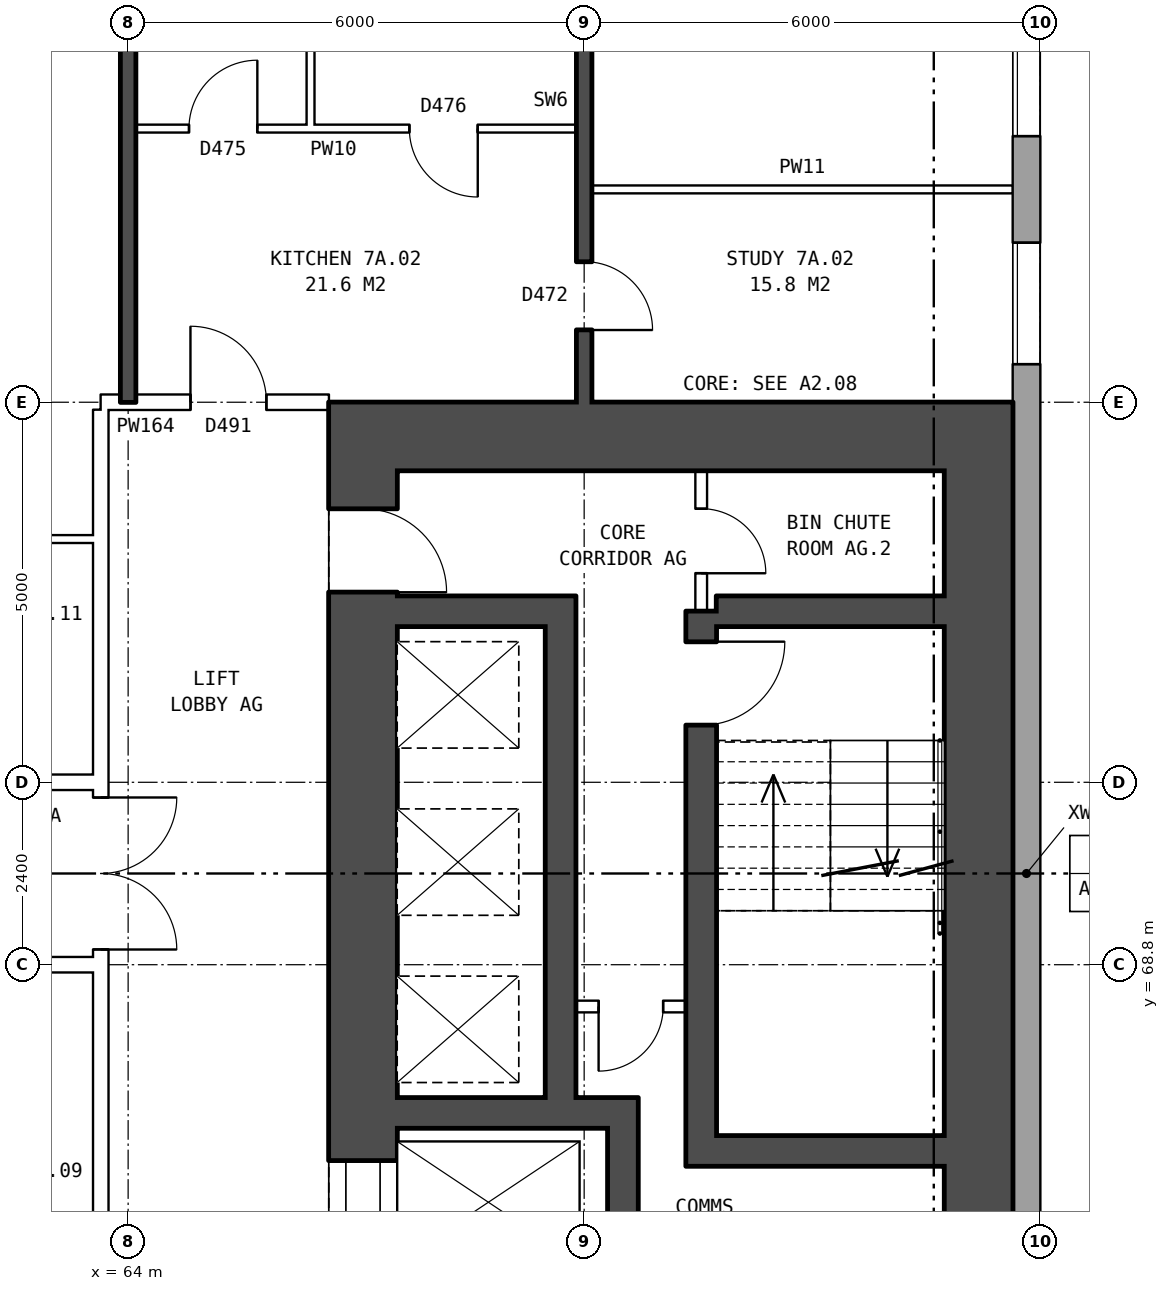
"""IFC4 building model, lengths in metres.
Left out: names, types, materials, properties, quantities, classifications, styles, units other than length and angle.
Written with IfcOpenShell. Run it as: python <this file> out.ifc"""

import sys

from ifc_helpers import new_model, si_unit, direction, frame, frame_2d, origin, place, context, subcontext, project, spatial, rectangle, extrude, element, fill, save


model = new_model("IFC4")
c1 = context("Model", 3, precision=1e-05, world=origin(), true_north=direction((0.0, 1.0)))
c2 = subcontext(c1, "Body", "Model", "MODEL_VIEW")
j1 = project(units=[si_unit("LENGTHUNIT", "METRE"), si_unit("PLANEANGLEUNIT", "RADIAN")], contexts=[c1])
p1 = place(None, origin())
s1 = spatial("IfcSite", under=j1, at=p1, CompositionType="ELEMENT")
p2 = place(p1, origin())
s2 = spatial("IfcBuilding", under=s1, at=p2, CompositionType="ELEMENT")
p3 = place(p2, frame((0.0, 0.0, 28.8)))
s3 = spatial("IfcBuildingStorey", under=s2, at=p3, CompositionType="ELEMENT", Elevation=28.8)
p4 = place(p3, frame((75.82, 57.075, 0.0), z_axis=(0.0, 0.0, 1.0), x_axis=(0.0, 1.0, 0.0)))
e1 = element("IfcWall", 1, at=p4, inside=s3, PredefinedType="STANDARD", context=c2, shape_type="SweptSolid", body=[
    extrude(rectangle(XDim=25.851, YDim=0.36, at=frame_2d((12.925, 0.0))), origin(), (0.0, 0.0, 1.0), 2.85),
])
p5 = place(p4, frame((1.625, 0.0, 0.8)))
e2 = element("IfcOpeningElement", 2, at=p5, cuts=e1, PredefinedType="OPENING", context=c2, shape_type="SweptSolid", body=[
    extrude(rectangle(XDim=1.6, YDim=1.8, at=frame_2d((0.8, 0.9))), frame((0.0, 0.19, 0.0), z_axis=(0.0, -1.0, 0.0), x_axis=(1.0, 0.0, 0.0)), (0.0, 0.0, 1.0), 0.38),
])
p6 = place(p4, frame((4.625, 0.0, 0.8)))
e3 = element("IfcOpeningElement", 3, at=p6, cuts=e1, PredefinedType="OPENING", context=c2, shape_type="SweptSolid", body=[
    extrude(rectangle(XDim=1.6, YDim=1.8, at=frame_2d((0.8, 0.9))), frame((0.0, 0.19, 0.0), z_axis=(0.0, -1.0, 0.0), x_axis=(1.0, 0.0, 0.0)), (0.0, 0.0, 1.0), 0.38),
])
p7 = place(p4, frame((19.625, 0.0, 0.8)))
e4 = element("IfcOpeningElement", 4, at=p7, cuts=e1, PredefinedType="OPENING", context=c2, shape_type="SweptSolid", body=[
    extrude(rectangle(XDim=1.6, YDim=1.8, at=frame_2d((0.8, 0.9))), frame((0.0, 0.19, 0.0), z_axis=(0.0, -1.0, 0.0), x_axis=(1.0, 0.0, 0.0)), (0.0, 0.0, 1.0), 0.38),
])
p8 = place(p4, frame((22.625, 0.0, 0.8)))
e5 = element("IfcOpeningElement", 5, at=p8, cuts=e1, PredefinedType="OPENING", context=c2, shape_type="SweptSolid", body=[
    extrude(rectangle(XDim=1.6, YDim=1.8, at=frame_2d((0.8, 0.9))), frame((0.0, 0.19, 0.0), z_axis=(0.0, -1.0, 0.0), x_axis=(1.0, 0.0, 0.0)), (0.0, 0.0, 1.0), 0.38),
])
p9 = place(p3, frame((67.09, 64.7, 0.0), z_axis=(0.0, 0.0, 1.0), x_axis=(0.0, 1.0, 0.0)))
e6 = element("IfcWall", 6, at=p9, inside=s3, PredefinedType="SHEAR", context=c2, shape_type="SweptSolid", body=[
    extrude(rectangle(XDim=10.6, YDim=0.9, at=frame_2d((5.3, 0.0))), origin(), (0.0, 0.0, 1.0), 2.85),
])
p10 = place(p9, frame((0.425, 0.0, 0.0)))
e7 = element("IfcOpeningElement", 7, at=p10, cuts=e6, PredefinedType="OPENING", context=c2, shape_type="SweptSolid", body=[
    extrude(rectangle(XDim=1.1, YDim=2.1, at=frame_2d((0.55, 1.05))), frame((0.0, 0.46, 0.0), z_axis=(0.0, -1.0, 0.0), x_axis=(1.0, 0.0, 0.0)), (0.0, 0.0, 1.0), 0.92),
])
p11 = place(p9, frame((9.0, 0.0, 0.0)))
e8 = element("IfcOpeningElement", 8, at=p11, cuts=e6, PredefinedType="OPENING", context=c2, shape_type="SweptSolid", body=[
    extrude(rectangle(XDim=1.1, YDim=2.1, at=frame_2d((0.55, 1.05))), frame((0.0, 0.46, 0.0), z_axis=(0.0, -1.0, 0.0), x_axis=(1.0, 0.0, 0.0)), (0.0, 0.0, 1.0), 0.92),
])
p12 = place(p3, frame((75.19, 64.7, 0.0), z_axis=(0.0, 0.0, 1.0), x_axis=(0.0, 1.0, 0.0)))
e9 = element("IfcWall", 9, at=p12, inside=s3, PredefinedType="SHEAR", context=c2, shape_type="SweptSolid", body=[
    extrude(rectangle(XDim=10.6, YDim=0.9, at=frame_2d((5.3, 0.0))), origin(), (0.0, 0.0, 1.0), 2.85),
])
p13 = place(p3, frame((66.64, 75.75, 0.0), z_axis=(0.0, 0.0, 1.0), x_axis=(1.0, 0.0, 0.0)))
e10 = element("IfcWall", 10, at=p13, inside=s3, PredefinedType="SHEAR", context=c2, shape_type="SweptSolid", body=[
    extrude(rectangle(XDim=9.0, YDim=0.9, at=frame_2d((4.5, 0.0))), origin(), (0.0, 0.0, 1.0), 2.85),
])
p14 = place(p3, frame((71.74, 66.35, 0.0), z_axis=(0.0, 0.0, 1.0), x_axis=(1.0, 0.0, 0.0)))
e11 = element("IfcWall", 11, at=p14, inside=s3, PredefinedType="SHEAR", context=c2, shape_type="SweptSolid", body=[
    extrude(rectangle(XDim=3.0, YDim=0.4, at=frame_2d((1.5, 0.0))), origin(), (0.0, 0.0, 1.0), 2.85),
])
p15 = place(p3, frame((67.54, 66.85, 0.0), z_axis=(0.0, 0.0, 1.0), x_axis=(1.0, 0.0, 0.0)))
e12 = element("IfcWall", 12, at=p15, inside=s3, PredefinedType="SHEAR", context=c2, shape_type="SweptSolid", body=[
    extrude(rectangle(XDim=3.17, YDim=0.4, at=frame_2d((1.585, 0.0))), origin(), (0.0, 0.0, 1.0), 2.85),
])
p16 = place(p3, frame((69.89, 68.25, 0.0), z_axis=(0.0, 0.0, 1.0), x_axis=(1.0, 0.0, 0.0)))
e13 = element("IfcWall", 13, at=p16, inside=s3, PredefinedType="PARTITIONING", context=c2, shape_type="SweptSolid", body=[
    extrude(rectangle(XDim=1.45, YDim=0.15, at=frame_2d((0.725, 0.0))), origin(), (0.0, 0.0, 1.0), 2.85),
])
p17 = place(p16, frame((0.3, 0.0, 0.0)))
e14 = element("IfcOpeningElement", 14, at=p17, cuts=e13, PredefinedType="OPENING", context=c2, shape_type="SweptSolid", body=[
    extrude(rectangle(XDim=0.85, YDim=2.1, at=frame_2d((0.425, 1.05))), frame((0.0, 0.085, 0.0), z_axis=(0.0, -1.0, 0.0), x_axis=(1.0, 0.0, 0.0)), (0.0, 0.0, 1.0), 0.17),
])
p18 = place(p3, frame((67.54, 73.45, 0.0), z_axis=(0.0, 0.0, 1.0), x_axis=(1.0, 0.0, 0.0)))
e15 = element("IfcWall", 15, at=p18, inside=s3, PredefinedType="SHEAR", context=c2, shape_type="SweptSolid", body=[
    extrude(rectangle(XDim=1.95, YDim=0.4, at=frame_2d((0.975, 0.0))), origin(), (0.0, 0.0, 1.0), 2.85),
])
p19 = place(p3, frame((71.74, 73.45, 0.0), z_axis=(0.0, 0.0, 1.0), x_axis=(1.0, 0.0, 0.0)))
e16 = element("IfcWall", 16, at=p19, inside=s3, PredefinedType="SHEAR", context=c2, shape_type="SweptSolid", body=[
    extrude(rectangle(XDim=3.0, YDim=0.4, at=frame_2d((1.5, 0.0))), origin(), (0.0, 0.0, 1.0), 2.85),
])
p20 = place(p3, frame((69.69, 67.05, 0.0), z_axis=(0.0, 0.0, 1.0), x_axis=(0.0, 1.0, 0.0)))
e17 = element("IfcWall", 17, at=p20, inside=s3, PredefinedType="SHEAR", context=c2, shape_type="SweptSolid", body=[
    extrude(rectangle(XDim=6.6, YDim=0.4, at=frame_2d((3.3, 0.0))), origin(), (0.0, 0.0, 1.0), 2.85),
])
p21 = place(p3, frame((70.51, 64.7, 0.0), z_axis=(0.0, 0.0, 1.0), x_axis=(0.0, 1.0, 0.0)))
e18 = element("IfcWall", 18, at=p21, inside=s3, PredefinedType="SHEAR", context=c2, shape_type="SweptSolid", body=[
    extrude(rectangle(XDim=1.95, YDim=0.4, at=frame_2d((0.975, 0.0))), origin(), (0.0, 0.0, 1.0), 2.85),
])
p22 = place(p3, frame((71.54, 66.15, 0.0), z_axis=(0.0, 0.0, 1.0), x_axis=(0.0, 1.0, 0.0)))
e19 = element("IfcWall", 19, at=p22, inside=s3, PredefinedType="SHEAR", context=c2, shape_type="SweptSolid", body=[
    extrude(rectangle(XDim=7.3, YDim=0.4, at=frame_2d((3.65, 0.0))), origin(), (0.0, 0.0, 1.0), 2.85),
])
p23 = place(p22, frame((5.8, 0.0, 0.0)))
e20 = element("IfcOpeningElement", 20, at=p23, cuts=e19, PredefinedType="OPENING", context=c2, shape_type="SweptSolid", body=[
    extrude(rectangle(XDim=1.1, YDim=2.1, at=frame_2d((0.55, 1.05))), frame((0.0, 0.21, 0.0), z_axis=(0.0, -1.0, 0.0), x_axis=(1.0, 0.0, 0.0)), (0.0, 0.0, 1.0), 0.42),
])
p24 = place(p3, frame((71.54, 73.45, 0.0), z_axis=(0.0, 0.0, 1.0), x_axis=(0.0, 1.0, 0.0)))
e21 = element("IfcWall", 21, at=p24, inside=s3, PredefinedType="PARTITIONING", context=c2, shape_type="SweptSolid", body=[
    extrude(rectangle(XDim=1.85, YDim=0.15, at=frame_2d((0.925, 0.0))), origin(), (0.0, 0.0, 1.0), 2.85),
])
p25 = place(p24, frame((0.5, 0.0, 0.0)))
e22 = element("IfcOpeningElement", 22, at=p25, cuts=e21, PredefinedType="OPENING", context=c2, shape_type="SweptSolid", body=[
    extrude(rectangle(XDim=0.85, YDim=2.1, at=frame_2d((0.425, 1.05))), frame((0.0, 0.085, 0.0), z_axis=(0.0, -1.0, 0.0), x_axis=(1.0, 0.0, 0.0)), (0.0, 0.0, 1.0), 0.17),
])
p26 = place(p3, frame((63.64, 63.9, 0.0), z_axis=(0.0, 0.0, 1.0), x_axis=(0.0, 1.0, 0.0)))
e23 = element("IfcWall", 23, at=p26, inside=s3, PredefinedType="PARTITIONING", context=c2, shape_type="SweptSolid", body=[
    extrude(rectangle(XDim=12.2, YDim=0.2, at=frame_2d((6.1, 0.0))), origin(), (0.0, 0.0, 1.0), 2.85),
])
p27 = place(p26, frame((5.1, 0.0, 0.0)))
e24 = element("IfcOpeningElement", 24, at=p27, cuts=e23, PredefinedType="OPENING", context=c2, shape_type="SweptSolid", body=[
    extrude(rectangle(XDim=2.0, YDim=2.1, at=frame_2d((1.0, 1.05))), frame((0.0, 0.11, 0.0), z_axis=(0.0, -1.0, 0.0), x_axis=(1.0, 0.0, 0.0)), (0.0, 0.0, 1.0), 0.22),
])
p28 = place(p3, frame((44.36, 68.8, 0.0), z_axis=(0.0, 0.0, 1.0), x_axis=(1.0, 0.0, 0.0)))
e25 = element("IfcWall", 25, at=p28, inside=s3, PredefinedType="PARTITIONING", context=c2, shape_type="SweptSolid", body=[
    extrude(rectangle(XDim=19.28, YDim=0.2, at=frame_2d((9.64, 0.0))), origin(), (0.0, 0.0, 1.0), 2.85),
])
p29 = place(p28, frame((14.64, 0.0, 0.0)))
e26 = element("IfcOpeningElement", 26, at=p29, cuts=e25, PredefinedType="OPENING", context=c2, shape_type="SweptSolid", body=[
    extrude(rectangle(XDim=1.0, YDim=2.1, at=frame_2d((0.5, 1.05))), frame((0.0, 0.11, 0.0), z_axis=(0.0, -1.0, 0.0), x_axis=(1.0, 0.0, 0.0)), (0.0, 0.0, 1.0), 0.22),
])
p30 = place(p28, frame((5.64, 0.0, 0.0)))
e27 = element("IfcOpeningElement", 27, at=p30, cuts=e25, PredefinedType="OPENING", context=c2, shape_type="SweptSolid", body=[
    extrude(rectangle(XDim=1.0, YDim=2.1, at=frame_2d((0.5, 1.05))), frame((0.0, 0.11, 0.0), z_axis=(0.0, -1.0, 0.0), x_axis=(1.0, 0.0, 0.0)), (0.0, 0.0, 1.0), 0.22),
])
p31 = place(p3, frame((44.36, 71.2, 0.0), z_axis=(0.0, 0.0, 1.0), x_axis=(1.0, 0.0, 0.0)))
e28 = element("IfcWall", 28, at=p31, inside=s3, PredefinedType="PARTITIONING", context=c2, shape_type="SweptSolid", body=[
    extrude(rectangle(XDim=19.28, YDim=0.2, at=frame_2d((9.64, 0.0))), origin(), (0.0, 0.0, 1.0), 2.85),
])
p32 = place(p31, frame((14.64, 0.0, 0.0)))
e29 = element("IfcOpeningElement", 29, at=p32, cuts=e28, PredefinedType="OPENING", context=c2, shape_type="SweptSolid", body=[
    extrude(rectangle(XDim=1.0, YDim=2.1, at=frame_2d((0.5, 1.05))), frame((0.0, 0.11, 0.0), z_axis=(0.0, -1.0, 0.0), x_axis=(1.0, 0.0, 0.0)), (0.0, 0.0, 1.0), 0.22),
])
p33 = place(p31, frame((5.64, 0.0, 0.0)))
e30 = element("IfcOpeningElement", 30, at=p33, cuts=e28, PredefinedType="OPENING", context=c2, shape_type="SweptSolid", body=[
    extrude(rectangle(XDim=1.0, YDim=2.1, at=frame_2d((0.5, 1.05))), frame((0.0, 0.11, 0.0), z_axis=(0.0, -1.0, 0.0), x_axis=(1.0, 0.0, 0.0)), (0.0, 0.0, 1.0), 0.22),
])
p34 = place(p3, frame((61.0, 74.4, 0.0), z_axis=(0.0, 0.0, 1.0), x_axis=(1.0, 0.0, 0.0)))
e31 = element("IfcWall", 31, at=p34, inside=s3, PredefinedType="PARTITIONING", context=c2, shape_type="SweptSolid", body=[
    extrude(rectangle(XDim=2.64, YDim=0.1, at=frame_2d((1.32, 0.0))), origin(), (0.0, 0.0, 1.0), 2.85),
])
p35 = place(p3, frame((63.64, 76.2, 0.0), z_axis=(0.0, 0.0, 1.0), x_axis=(1.0, 0.0, 0.0)))
e32 = element("IfcWall", 32, at=p35, inside=s3, PredefinedType="PARTITIONING", context=c2, shape_type="SweptSolid", body=[
    extrude(rectangle(XDim=3.0, YDim=0.2, at=frame_2d((1.5, 0.0))), origin(), (0.0, 0.0, 1.0), 2.85),
])
p36 = place(p35, frame((1.18, 0.0, 0.0)))
e33 = element("IfcOpeningElement", 33, at=p36, cuts=e32, PredefinedType="OPENING", context=c2, shape_type="SweptSolid", body=[
    extrude(rectangle(XDim=1.0, YDim=2.1, at=frame_2d((0.5, 1.05))), frame((0.0, 0.11, 0.0), z_axis=(0.0, -1.0, 0.0), x_axis=(1.0, 0.0, 0.0)), (0.0, 0.0, 1.0), 0.22),
])
p37 = place(p3, frame((70.1, 79.0, 0.0), z_axis=(0.0, 0.0, 1.0), x_axis=(1.0, 0.0, 0.0)))
e34 = element("IfcWall", 34, at=p37, inside=s3, PredefinedType="PARTITIONING", context=c2, shape_type="SweptSolid", body=[
    extrude(rectangle(XDim=5.54, YDim=0.1, at=frame_2d((2.77, 0.0))), origin(), (0.0, 0.0, 1.0), 2.85),
])
p38 = place(p3, frame((64.1, 79.8, 0.0), z_axis=(0.0, 0.0, 1.0), x_axis=(1.0, 0.0, 0.0)))
e35 = element("IfcWall", 35, at=p38, inside=s3, PredefinedType="PARTITIONING", context=c2, shape_type="SweptSolid", body=[
    extrude(rectangle(XDim=5.8, YDim=0.1, at=frame_2d((2.9, 0.0))), origin(), (0.0, 0.0, 1.0), 2.85),
])
p39 = place(p38, frame((3.6, 0.0, 0.0)))
e36 = element("IfcOpeningElement", 36, at=p39, cuts=e35, PredefinedType="OPENING", context=c2, shape_type="SweptSolid", body=[
    extrude(rectangle(XDim=0.9, YDim=2.1, at=frame_2d((0.45, 1.05))), frame((0.0, 0.06, 0.0), z_axis=(0.0, -1.0, 0.0), x_axis=(1.0, 0.0, 0.0)), (0.0, 0.0, 1.0), 0.12),
])
p40 = place(p38, frame((0.7, 0.0, 0.0)))
e37 = element("IfcOpeningElement", 37, at=p40, cuts=e35, PredefinedType="OPENING", context=c2, shape_type="SweptSolid", body=[
    extrude(rectangle(XDim=0.9, YDim=2.1, at=frame_2d((0.45, 1.05))), frame((0.0, 0.06, 0.0), z_axis=(0.0, -1.0, 0.0), x_axis=(1.0, 0.0, 0.0)), (0.0, 0.0, 1.0), 0.12),
])
p41 = place(p3, frame((64.0, 76.2, 0.0), z_axis=(0.0, 0.0, 1.0), x_axis=(0.0, 1.0, 0.0)))
e38 = element("IfcWall", 38, at=p41, inside=s3, PredefinedType="SOLIDWALL", context=c2, shape_type="SweptSolid", body=[
    extrude(rectangle(XDim=9.44, YDim=0.2, at=frame_2d((4.72, 0.0))), origin(), (0.0, 0.0, 1.0), 2.85),
])
p42 = place(p3, frame((66.4, 79.85, 0.0), z_axis=(0.0, 0.0, 1.0), x_axis=(0.0, 1.0, 0.0)))
e39 = element("IfcWall", 39, at=p42, inside=s3, PredefinedType="PARTITIONING", context=c2, shape_type="SweptSolid", body=[
    extrude(rectangle(XDim=2.3, YDim=0.1, at=frame_2d((1.15, 0.0))), origin(), (0.0, 0.0, 1.0), 2.85),
])
p43 = place(p3, frame((70.0, 76.2, 0.0), z_axis=(0.0, 0.0, 1.0), x_axis=(0.0, 1.0, 0.0)))
e40 = element("IfcWall", 40, at=p43, inside=s3, PredefinedType="SOLIDWALL", context=c2, shape_type="SweptSolid", body=[
    extrude(rectangle(XDim=9.44, YDim=0.2, at=frame_2d((4.72, 0.0))), origin(), (0.0, 0.0, 1.0), 2.85),
])
p44 = place(p43, frame((6.07, 0.0, 0.0)))
e41 = element("IfcOpeningElement", 41, at=p44, cuts=e40, PredefinedType="OPENING", context=c2, shape_type="SweptSolid", body=[
    extrude(rectangle(XDim=0.9, YDim=2.1, at=frame_2d((0.45, 1.05))), frame((0.0, 0.11, 0.0), z_axis=(0.0, -1.0, 0.0), x_axis=(1.0, 0.0, 0.0)), (0.0, 0.0, 1.0), 0.22),
])
p45 = place(p43, frame((0.95, 0.0, 0.0)))
e42 = element("IfcOpeningElement", 42, at=p45, cuts=e40, PredefinedType="OPENING", context=c2, shape_type="SweptSolid", body=[
    extrude(rectangle(XDim=0.9, YDim=2.1, at=frame_2d((0.45, 1.05))), frame((0.0, 0.11, 0.0), z_axis=(0.0, -1.0, 0.0), x_axis=(1.0, 0.0, 0.0)), (0.0, 0.0, 1.0), 0.22),
])
p46 = place(p7, origin())
e43 = element("IfcWindow", 43, at=p46, inside=s3, PartitioningType="SINGLE_PANEL", PredefinedType="WINDOW", context=c2, shape_type="SweptSolid", body=[
    extrude(rectangle(XDim=1.6, YDim=1.8, at=frame_2d((0.8, 0.9))), frame((0.0, 0.15, 0.0), z_axis=(0.0, -1.0, 0.0), x_axis=(1.0, 0.0, 0.0)), (0.0, 0.0, 1.0), 0.06),
])
fill(e4, e43)
p47 = place(p8, origin())
e44 = element("IfcWindow", 44, at=p47, inside=s3, PartitioningType="SINGLE_PANEL", PredefinedType="WINDOW", context=c2, shape_type="SweptSolid", body=[
    extrude(rectangle(XDim=1.6, YDim=1.8, at=frame_2d((0.8, 0.9))), frame((0.0, 0.15, 0.0), z_axis=(0.0, -1.0, 0.0), x_axis=(1.0, 0.0, 0.0)), (0.0, 0.0, 1.0), 0.06),
])
fill(e5, e44)
p48 = place(p10, origin())
e45 = element("IfcDoor", 45, at=p48, inside=s3, OperationType="DOUBLE_DOOR_SLIDING", PredefinedType="DOOR", context=c2, shape_type="SweptSolid", body=[
    extrude(rectangle(XDim=1.1, YDim=2.1, at=frame_2d((0.55, 1.05))), frame((0.0, -0.385, 0.0), z_axis=(0.0, -1.0, 0.0), x_axis=(1.0, 0.0, 0.0)), (0.0, 0.0, 1.0), 0.05),
])
fill(e7, e45)
p49 = place(p11, frame((1.1, 0.0, 0.0), z_axis=(0.0, 0.0, 1.0), x_axis=(-1.0, 0.0, 0.0)))
e46 = element("IfcDoor", 46, at=p49, inside=s3, OperationType="SINGLE_SWING_RIGHT", PredefinedType="DOOR", context=c2, shape_type="SweptSolid", body=[
    extrude(rectangle(XDim=1.1, YDim=2.1, at=frame_2d((0.55, 1.05))), frame((0.0, 0.435, 0.0), z_axis=(0.0, -1.0, 0.0), x_axis=(1.0, 0.0, 0.0)), (0.0, 0.0, 1.0), 0.05),
])
fill(e8, e46)
p50 = place(p23, frame((1.1, 0.0, 0.0), z_axis=(0.0, 0.0, 1.0), x_axis=(-1.0, 0.0, 0.0)))
e47 = element("IfcDoor", 47, at=p50, inside=s3, OperationType="SINGLE_SWING_LEFT", PredefinedType="DOOR", context=c2, shape_type="SweptSolid", body=[
    extrude(rectangle(XDim=1.1, YDim=2.1, at=frame_2d((0.55, 1.05))), frame((0.0, 0.025, 0.0), z_axis=(0.0, -1.0, 0.0), x_axis=(1.0, 0.0, 0.0)), (0.0, 0.0, 1.0), 0.05),
])
fill(e20, e47)
p51 = place(p17, frame((0.85, 0.0, 0.0), z_axis=(0.0, 0.0, 1.0), x_axis=(-1.0, 0.0, 0.0)))
e48 = element("IfcDoor", 48, at=p51, inside=s3, OperationType="SINGLE_SWING_RIGHT", PredefinedType="DOOR", context=c2, shape_type="SweptSolid", body=[
    extrude(rectangle(XDim=0.85, YDim=2.1, at=frame_2d((0.425, 1.05))), frame((0.0, 0.025, 0.0), z_axis=(0.0, -1.0, 0.0), x_axis=(1.0, 0.0, 0.0)), (0.0, 0.0, 1.0), 0.05),
])
fill(e14, e48)
p52 = place(p25, frame((0.85, 0.0, 0.0), z_axis=(0.0, 0.0, 1.0), x_axis=(-1.0, 0.0, 0.0)))
e49 = element("IfcDoor", 49, at=p52, inside=s3, OperationType="SINGLE_SWING_RIGHT", PredefinedType="DOOR", context=c2, shape_type="SweptSolid", body=[
    extrude(rectangle(XDim=0.85, YDim=2.1, at=frame_2d((0.425, 1.05))), frame((0.0, 0.025, 0.0), z_axis=(0.0, -1.0, 0.0), x_axis=(1.0, 0.0, 0.0)), (0.0, 0.0, 1.0), 0.05),
])
fill(e22, e49)
p53 = place(p27, frame((2.0, 0.0, 0.0), z_axis=(0.0, 0.0, 1.0), x_axis=(-1.0, 0.0, 0.0)))
e50 = element("IfcDoor", 50, at=p53, inside=s3, OperationType="DOUBLE_DOOR_SINGLE_SWING", PredefinedType="DOOR", context=c2, shape_type="SweptSolid", body=[
    extrude(rectangle(XDim=2.0, YDim=2.1, at=frame_2d((1.0, 1.05))), frame((0.0, 0.025, 0.0), z_axis=(0.0, -1.0, 0.0), x_axis=(1.0, 0.0, 0.0)), (0.0, 0.0, 1.0), 0.05),
])
fill(e24, e50)
p54 = place(p45, frame((0.9, 0.0, 0.0), z_axis=(0.0, 0.0, 1.0), x_axis=(-1.0, 0.0, 0.0)))
e51 = element("IfcDoor", 51, at=p54, inside=s3, OperationType="SINGLE_SWING_RIGHT", PredefinedType="DOOR", context=c2, shape_type="SweptSolid", body=[
    extrude(rectangle(XDim=0.9, YDim=2.1, at=frame_2d((0.45, 1.05))), frame((0.0, 0.025, 0.0), z_axis=(0.0, -1.0, 0.0), x_axis=(1.0, 0.0, 0.0)), (0.0, 0.0, 1.0), 0.05),
])
fill(e42, e51)
p55 = place(p36, origin())
e52 = element("IfcDoor", 52, at=p55, inside=s3, OperationType="SINGLE_SWING_LEFT", PredefinedType="DOOR", context=c2, shape_type="SweptSolid", body=[
    extrude(rectangle(XDim=1.0, YDim=2.1, at=frame_2d((0.5, 1.05))), frame((0.0, 0.025, 0.0), z_axis=(0.0, -1.0, 0.0), x_axis=(1.0, 0.0, 0.0)), (0.0, 0.0, 1.0), 0.05),
])
fill(e33, e52)
p56 = place(p39, frame((0.9, 0.0, 0.0), z_axis=(0.0, 0.0, 1.0), x_axis=(-1.0, 0.0, 0.0)))
e53 = element("IfcDoor", 53, at=p56, inside=s3, OperationType="SINGLE_SWING_LEFT", PredefinedType="DOOR", context=c2, shape_type="SweptSolid", body=[
    extrude(rectangle(XDim=0.9, YDim=2.1, at=frame_2d((0.45, 1.05))), frame((0.0, 0.025, 0.0), z_axis=(0.0, -1.0, 0.0), x_axis=(1.0, 0.0, 0.0)), (0.0, 0.0, 1.0), 0.05),
])
fill(e36, e53)
p57 = place(p40, origin())
e54 = element("IfcDoor", 54, at=p57, inside=s3, OperationType="SINGLE_SWING_RIGHT", PredefinedType="DOOR", context=c2, shape_type="SweptSolid", body=[
    extrude(rectangle(XDim=0.9, YDim=2.1, at=frame_2d((0.45, 1.05))), frame((0.0, 0.025, 0.0), z_axis=(0.0, -1.0, 0.0), x_axis=(1.0, 0.0, 0.0)), (0.0, 0.0, 1.0), 0.05),
])
fill(e37, e54)
save(model, sys.argv[1])
